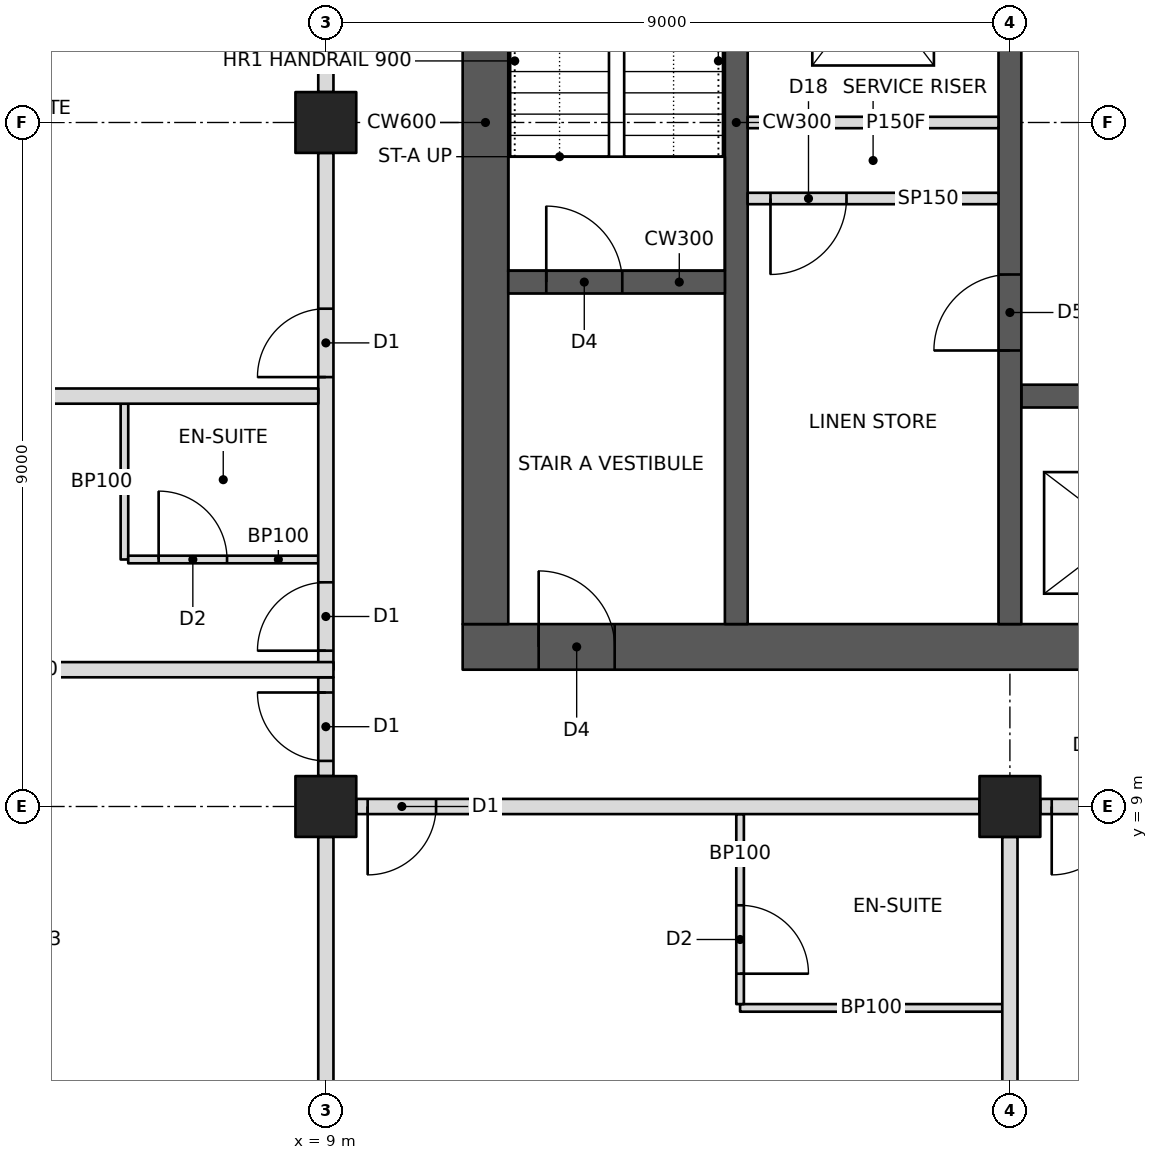
"""IFC4 building model, lengths in metres.
Left out: names, types, materials, properties, quantities, classifications, styles, units other than length and angle.
Written with IfcOpenShell. Run it as: python <this file> out.ifc"""

import sys

from ifc_helpers import new_model, si_unit, direction, frame, frame_2d, origin, origin_2d, place, context, subcontext, project, spatial, rectangle, hollow_rectangle, extrude, element, fill, save


model = new_model("IFC4")
c1 = context("Model", 3, precision=1e-05, world=origin(), true_north=direction((0.0, 1.0)))
c2 = subcontext(c1, "Body", "Model", "MODEL_VIEW")
j1 = project(units=[si_unit("LENGTHUNIT", "METRE"), si_unit("PLANEANGLEUNIT", "RADIAN")], contexts=[c1])
p1 = place(None, origin())
s1 = spatial("IfcSite", under=j1, at=p1, CompositionType="ELEMENT")
p2 = place(p1, origin())
s2 = spatial("IfcBuilding", under=s1, at=p2, CompositionType="ELEMENT")
p3 = place(p2, frame((0.0, 0.0, 180.8)))
s3 = spatial("IfcBuildingStorey", under=s2, at=p3, CompositionType="ELEMENT", Elevation=180.8)
for number, where, z_axis, x_axis in (
    (1, (9.0, 9.0, 0.0), (0.0, 0.0, 1.0), (1.0, 0.0, 0.0)),
    (2, (9.0, 18.0, 0.0), (0.0, 0.0, 1.0), (1.0, 0.0, 0.0)),
    (3, (18.0, 9.0, 0.0), (0.0, 0.0, 1.0), (1.0, 0.0, 0.0)),
):
    element("IfcColumn", number, at=place(p3, frame(where, z_axis=z_axis, x_axis=x_axis)), inside=s3, PredefinedType="COLUMN", context=c2, shape_type="SweptSolid", body=[
        extrude(hollow_rectangle(XDim=0.8, YDim=0.8, WallThickness=0.06, at=origin_2d()), origin(), (0.0, 0.0, 1.0), 3.4),
    ])
p4 = place(p3, frame((10.8, 11.1, 0.0), z_axis=(0.0, 0.0, 1.0), x_axis=(1.0, 0.0, 0.0)))
e4 = element("IfcWall", 4, at=p4, inside=s3, PredefinedType="SHEAR", context=c2, shape_type="SweptSolid", body=[
    extrude(rectangle(XDim=23.4, YDim=0.6, at=frame_2d((11.7, 0.0))), origin(), (0.0, 0.0, 1.0), 3.4),
])
p5 = place(p4, frame((1.0, 0.0, 0.0)))
e5 = element("IfcOpeningElement", 5, at=p5, cuts=e4, PredefinedType="OPENING", context=c2, shape_type="SweptSolid", body=[
    extrude(rectangle(XDim=1.0, YDim=2.1, at=frame_2d((0.5, 1.05))), frame((0.0, 0.31, 0.0), z_axis=(0.0, -1.0, 0.0), x_axis=(1.0, 0.0, 0.0)), (0.0, 0.0, 1.0), 0.62),
])
p6 = place(p4, frame((17.2, 0.0, 0.0)))
e6 = element("IfcOpeningElement", 6, at=p6, cuts=e4, PredefinedType="OPENING", context=c2, shape_type="SweptSolid", body=[
    extrude(rectangle(XDim=1.8, YDim=2.1, at=frame_2d((0.9, 1.05))), frame((0.0, 0.31, 0.0), z_axis=(0.0, -1.0, 0.0), x_axis=(1.0, 0.0, 0.0)), (0.0, 0.0, 1.0), 0.62),
])
p7 = place(p3, frame((11.1, 11.4, 0.0), z_axis=(0.0, 0.0, 1.0), x_axis=(0.0, 1.0, 0.0)))
e7 = element("IfcWall", 7, at=p7, inside=s3, PredefinedType="SHEAR", context=c2, shape_type="SweptSolid", body=[
    extrude(rectangle(XDim=13.2, YDim=0.6, at=frame_2d((6.6, 0.0))), origin(), (0.0, 0.0, 1.0), 3.4),
])
p8 = place(p3, frame((14.4, 11.4, 0.0), z_axis=(0.0, 0.0, 1.0), x_axis=(0.0, 1.0, 0.0)))
e8 = element("IfcWall", 8, at=p8, inside=s3, PredefinedType="SHEAR", context=c2, shape_type="SweptSolid", body=[
    extrude(rectangle(XDim=13.2, YDim=0.3, at=frame_2d((6.6, 0.0))), origin(), (0.0, 0.0, 1.0), 3.4),
])
p9 = place(p3, frame((11.4, 15.9, 0.0), z_axis=(0.0, 0.0, 1.0), x_axis=(1.0, 0.0, 0.0)))
e9 = element("IfcWall", 9, at=p9, inside=s3, PredefinedType="SHEAR", context=c2, shape_type="SweptSolid", body=[
    extrude(rectangle(XDim=2.85, YDim=0.3, at=frame_2d((1.425, 0.0))), origin(), (0.0, 0.0, 1.0), 3.4),
])
p10 = place(p9, frame((0.5, 0.0, 0.0)))
e10 = element("IfcOpeningElement", 10, at=p10, cuts=e9, PredefinedType="OPENING", context=c2, shape_type="SweptSolid", body=[
    extrude(rectangle(XDim=1.0, YDim=2.1, at=frame_2d((0.5, 1.05))), frame((0.0, 0.16, 0.0), z_axis=(0.0, -1.0, 0.0), x_axis=(1.0, 0.0, 0.0)), (0.0, 0.0, 1.0), 0.32),
])
p11 = place(p3, frame((18.0, 11.4, 0.0), z_axis=(0.0, 0.0, 1.0), x_axis=(0.0, 1.0, 0.0)))
e11 = element("IfcWall", 11, at=p11, inside=s3, PredefinedType="SHEAR", context=c2, shape_type="SweptSolid", body=[
    extrude(rectangle(XDim=13.2, YDim=0.3, at=frame_2d((6.6, 0.0))), origin(), (0.0, 0.0, 1.0), 3.4),
])
p12 = place(p11, frame((3.6, 0.0, 0.0)))
e12 = element("IfcOpeningElement", 12, at=p12, cuts=e11, PredefinedType="OPENING", context=c2, shape_type="SweptSolid", body=[
    extrude(rectangle(XDim=1.0, YDim=2.1, at=frame_2d((0.5, 1.05))), frame((0.0, 0.16, 0.0), z_axis=(0.0, -1.0, 0.0), x_axis=(1.0, 0.0, 0.0)), (0.0, 0.0, 1.0), 0.32),
])
p13 = place(p11, frame((7.85, 0.0, 0.0)))
e13 = element("IfcOpeningElement", 13, at=p13, cuts=e11, PredefinedType="OPENING", context=c2, shape_type="SweptSolid", body=[
    extrude(rectangle(XDim=1.1, YDim=2.1, at=frame_2d((0.55, 1.05))), frame((0.0, 0.16, 0.0), z_axis=(0.0, -1.0, 0.0), x_axis=(1.0, 0.0, 0.0)), (0.0, 0.0, 1.0), 0.32),
])
p14 = place(p3, frame((14.55, 18.0, 0.0), z_axis=(0.0, 0.0, 1.0), x_axis=(1.0, 0.0, 0.0)))
e14 = element("IfcWall", 14, at=p14, inside=s3, PredefinedType="PARTITIONING", context=c2, shape_type="SweptSolid", body=[
    extrude(rectangle(XDim=3.3, YDim=0.15, at=frame_2d((1.65, 0.0))), origin(), (0.0, 0.0, 1.0), 3.2),
])
p15 = place(p3, frame((18.15, 14.4, 0.0), z_axis=(0.0, 0.0, 1.0), x_axis=(1.0, 0.0, 0.0)))
e15 = element("IfcWall", 15, at=p15, inside=s3, PredefinedType="SHEAR", context=c2, shape_type="SweptSolid", body=[
    extrude(rectangle(XDim=9.0, YDim=0.3, at=frame_2d((4.5, 0.0))), origin(), (0.0, 0.0, 1.0), 3.4),
])
p16 = place(p15, frame((0.8, 0.0, 0.0)))
e16 = element("IfcOpeningElement", 16, at=p16, cuts=e15, PredefinedType="OPENING", context=c2, shape_type="SweptSolid", body=[
    extrude(rectangle(XDim=1.1, YDim=2.1, at=frame_2d((0.55, 1.05))), frame((0.0, 0.16, 0.0), z_axis=(0.0, -1.0, 0.0), x_axis=(1.0, 0.0, 0.0)), (0.0, 0.0, 1.0), 0.32),
])
p17 = place(p15, frame((6.75, 0.0, 0.0)))
e17 = element("IfcOpeningElement", 17, at=p17, cuts=e15, PredefinedType="OPENING", context=c2, shape_type="SweptSolid", body=[
    extrude(rectangle(XDim=1.2, YDim=2.1, at=frame_2d((0.6, 1.05))), frame((0.0, 0.16, 0.0), z_axis=(0.0, -1.0, 0.0), x_axis=(1.0, 0.0, 0.0)), (0.0, 0.0, 1.0), 0.32),
])
p18 = place(p15, frame((3.8, 0.0, 0.0)))
e18 = element("IfcOpeningElement", 18, at=p18, cuts=e15, PredefinedType="OPENING", context=c2, shape_type="SweptSolid", body=[
    extrude(rectangle(XDim=1.1, YDim=2.1, at=frame_2d((0.55, 1.05))), frame((0.0, 0.16, 0.0), z_axis=(0.0, -1.0, 0.0), x_axis=(1.0, 0.0, 0.0)), (0.0, 0.0, 1.0), 0.32),
])
p19 = place(p3, frame((9.4, 9.0, 0.0), z_axis=(0.0, 0.0, 1.0), x_axis=(1.0, 0.0, 0.0)))
e19 = element("IfcWall", 19, at=p19, inside=s3, PredefinedType="PARTITIONING", context=c2, shape_type="SweptSolid", body=[
    extrude(rectangle(XDim=8.2, YDim=0.2, at=frame_2d((4.1, 0.0))), origin(), (0.0, 0.0, 1.0), 2.405),
])
p20 = place(p19, frame((0.15, 0.0, 0.0)))
e20 = element("IfcOpeningElement", 20, at=p20, cuts=e19, PredefinedType="OPENING", context=c2, shape_type="SweptSolid", body=[
    extrude(rectangle(XDim=0.9, YDim=2.1, at=frame_2d((0.45, 1.05))), frame((0.0, 0.11, 0.0), z_axis=(0.0, -1.0, 0.0), x_axis=(1.0, 0.0, 0.0)), (0.0, 0.0, 1.0), 0.22),
])
p21 = place(p3, frame((18.4, 9.0, 0.0), z_axis=(0.0, 0.0, 1.0), x_axis=(1.0, 0.0, 0.0)))
e21 = element("IfcWall", 21, at=p21, inside=s3, PredefinedType="PARTITIONING", context=c2, shape_type="SweptSolid", body=[
    extrude(rectangle(XDim=8.2, YDim=0.2, at=frame_2d((4.1, 0.0))), origin(), (0.0, 0.0, 1.0), 2.405),
])
p22 = place(p21, frame((0.15, 0.0, 0.0)))
e22 = element("IfcOpeningElement", 22, at=p22, cuts=e21, PredefinedType="OPENING", context=c2, shape_type="SweptSolid", body=[
    extrude(rectangle(XDim=0.9, YDim=2.1, at=frame_2d((0.45, 1.05))), frame((0.0, 0.11, 0.0), z_axis=(0.0, -1.0, 0.0), x_axis=(1.0, 0.0, 0.0)), (0.0, 0.0, 1.0), 0.22),
])
p23 = place(p3, frame((9.0, 10.8, 0.0), z_axis=(0.0, 0.0, 1.0), x_axis=(0.0, 1.0, 0.0)))
e23 = element("IfcWall", 23, at=p23, inside=s3, PredefinedType="PARTITIONING", context=c2, shape_type="SweptSolid", body=[
    extrude(rectangle(XDim=6.8, YDim=0.2, at=frame_2d((3.4, 0.0))), origin(), (0.0, 0.0, 1.0), 2.405),
])
p24 = place(p23, frame((0.25, 0.0, 0.0)))
e24 = element("IfcOpeningElement", 24, at=p24, cuts=e23, PredefinedType="OPENING", context=c2, shape_type="SweptSolid", body=[
    extrude(rectangle(XDim=0.9, YDim=2.1, at=frame_2d((0.45, 1.05))), frame((0.0, 0.11, 0.0), z_axis=(0.0, -1.0, 0.0), x_axis=(1.0, 0.0, 0.0)), (0.0, 0.0, 1.0), 0.22),
])
p25 = place(p23, frame((3.85, 0.0, 0.0)))
e25 = element("IfcOpeningElement", 25, at=p25, cuts=e23, PredefinedType="OPENING", context=c2, shape_type="SweptSolid", body=[
    extrude(rectangle(XDim=0.9, YDim=2.1, at=frame_2d((0.45, 1.05))), frame((0.0, 0.11, 0.0), z_axis=(0.0, -1.0, 0.0), x_axis=(1.0, 0.0, 0.0)), (0.0, 0.0, 1.0), 0.22),
])
p26 = place(p3, frame((9.0, 18.4, 0.0), z_axis=(0.0, 0.0, 1.0), x_axis=(0.0, 1.0, 0.0)))
e26 = element("IfcWall", 26, at=p26, inside=s3, PredefinedType="PARTITIONING", context=c2, shape_type="SweptSolid", body=[
    extrude(rectangle(XDim=6.8, YDim=0.2, at=frame_2d((3.4, 0.0))), origin(), (0.0, 0.0, 1.0), 2.405),
])
p27 = place(p3, frame((1.0, 10.8, 0.0), z_axis=(0.0, 0.0, 1.0), x_axis=(1.0, 0.0, 0.0)))
e27 = element("IfcWall", 27, at=p27, inside=s3, PredefinedType="PARTITIONING", context=c2, shape_type="SweptSolid", body=[
    extrude(rectangle(XDim=8.1, YDim=0.2, at=frame_2d((4.05, 0.0))), origin(), (0.0, 0.0, 1.0), 2.404),
])
p28 = place(p3, frame((9.0, 8.6, 0.0), z_axis=(0.0, 0.0, 1.0), x_axis=(0.0, -1.0, 0.0)))
e28 = element("IfcWall", 28, at=p28, inside=s3, PredefinedType="PARTITIONING", context=c2, shape_type="SweptSolid", body=[
    extrude(rectangle(XDim=7.6, YDim=0.2, at=frame_2d((3.8, 0.0))), origin(), (0.0, 0.0, 1.0), 2.438),
])
p29 = place(p3, frame((18.0, 8.6, 0.0), z_axis=(0.0, 0.0, 1.0), x_axis=(0.0, -1.0, 0.0)))
e29 = element("IfcWall", 29, at=p29, inside=s3, PredefinedType="PARTITIONING", context=c2, shape_type="SweptSolid", body=[
    extrude(rectangle(XDim=7.6, YDim=0.2, at=frame_2d((3.8, 0.0))), origin(), (0.0, 0.0, 1.0), 2.405),
])
p30 = place(p3, frame((14.45, 6.35, 0.0), z_axis=(0.0, 0.0, 1.0), x_axis=(1.0, 0.0, 0.0)))
e30 = element("IfcWall", 30, at=p30, inside=s3, PredefinedType="PARTITIONING", context=c2, shape_type="SweptSolid", body=[
    extrude(rectangle(XDim=3.45, YDim=0.1, at=frame_2d((1.725, 0.0))), origin(), (0.0, 0.0, 1.0), 2.404),
])
p31 = place(p3, frame((14.45, 8.9, 0.0), z_axis=(0.0, 0.0, 1.0), x_axis=(0.0, -1.0, 0.0)))
e31 = element("IfcWall", 31, at=p31, inside=s3, PredefinedType="PARTITIONING", context=c2, shape_type="SweptSolid", body=[
    extrude(rectangle(XDim=2.5, YDim=0.1, at=frame_2d((1.25, 0.0))), origin(), (0.0, 0.0, 1.0), 2.404),
])
p32 = place(p31, frame((1.2, 0.0, 0.0)))
e32 = element("IfcOpeningElement", 32, at=p32, cuts=e31, PredefinedType="OPENING", context=c2, shape_type="SweptSolid", body=[
    extrude(rectangle(XDim=0.9, YDim=2.1, at=frame_2d((0.45, 1.05))), frame((0.0, 0.06, 0.0), z_axis=(0.0, -1.0, 0.0), x_axis=(1.0, 0.0, 0.0)), (0.0, 0.0, 1.0), 0.12),
])
p33 = place(p3, frame((8.9, 14.4, 0.0), z_axis=(0.0, 0.0, 1.0), x_axis=(-1.0, 0.0, 0.0)))
e33 = element("IfcWall", 33, at=p33, inside=s3, PredefinedType="PARTITIONING", context=c2, shape_type="SweptSolid", body=[
    extrude(rectangle(XDim=7.9, YDim=0.2, at=frame_2d((3.95, 0.0))), origin(), (0.0, 0.0, 1.0), 2.404),
])
p34 = place(p3, frame((6.35, 12.25, 0.0), z_axis=(0.0, 0.0, 1.0), x_axis=(0.0, 1.0, 0.0)))
e34 = element("IfcWall", 34, at=p34, inside=s3, PredefinedType="PARTITIONING", context=c2, shape_type="SweptSolid", body=[
    extrude(rectangle(XDim=2.05, YDim=0.1, at=frame_2d((1.025, 0.0))), origin(), (0.0, 0.0, 1.0), 3.2),
])
p35 = place(p3, frame((8.9, 12.25, 0.0), z_axis=(0.0, 0.0, 1.0), x_axis=(-1.0, 0.0, 0.0)))
e35 = element("IfcWall", 35, at=p35, inside=s3, PredefinedType="PARTITIONING", context=c2, shape_type="SweptSolid", body=[
    extrude(rectangle(XDim=2.5, YDim=0.1, at=frame_2d((1.25, 0.0))), origin(), (0.0, 0.0, 1.0), 2.404),
])
p36 = place(p35, frame((1.2, 0.0, 0.0)))
e36 = element("IfcOpeningElement", 36, at=p36, cuts=e35, PredefinedType="OPENING", context=c2, shape_type="SweptSolid", body=[
    extrude(rectangle(XDim=0.9, YDim=2.1, at=frame_2d((0.45, 1.05))), frame((0.0, 0.06, 0.0), z_axis=(0.0, -1.0, 0.0), x_axis=(1.0, 0.0, 0.0)), (0.0, 0.0, 1.0), 0.12),
])
p37 = place(p3, frame((9.0, 9.4, 0.0), z_axis=(0.0, 0.0, 1.0), x_axis=(0.0, 1.0, 0.0)))
e37 = element("IfcWall", 37, at=p37, inside=s3, PredefinedType="PARTITIONING", context=c2, shape_type="SweptSolid", body=[
    extrude(rectangle(XDim=1.3, YDim=0.2, at=frame_2d((0.65, 0.0))), origin(), (0.0, 0.0, 1.0), 2.405),
])
p38 = place(p37, frame((0.2, 0.0, 0.0)))
e38 = element("IfcOpeningElement", 38, at=p38, cuts=e37, PredefinedType="OPENING", context=c2, shape_type="SweptSolid", body=[
    extrude(rectangle(XDim=0.9, YDim=2.1, at=frame_2d((0.45, 1.05))), frame((0.0, 0.11, 0.0), z_axis=(0.0, -1.0, 0.0), x_axis=(1.0, 0.0, 0.0)), (0.0, 0.0, 1.0), 0.22),
])
p39 = place(p3, frame((14.55, 17.0, 0.0), z_axis=(0.0, 0.0, 1.0), x_axis=(1.0, 0.0, 0.0)))
e39 = element("IfcWall", 39, at=p39, inside=s3, PredefinedType="PARTITIONING", context=c2, shape_type="SweptSolid", body=[
    extrude(rectangle(XDim=3.3, YDim=0.15, at=frame_2d((1.65, 0.0))), origin(), (0.0, 0.0, 1.0), 3.2),
])
p40 = place(p39, frame((0.3, 0.0, 0.0)))
e40 = element("IfcOpeningElement", 40, at=p40, cuts=e39, PredefinedType="OPENING", context=c2, shape_type="SweptSolid", body=[
    extrude(rectangle(XDim=1.0, YDim=2.1, at=frame_2d((0.5, 1.05))), frame((0.0, 0.085, 0.0), z_axis=(0.0, -1.0, 0.0), x_axis=(1.0, 0.0, 0.0)), (0.0, 0.0, 1.0), 0.17),
])
p41 = place(p32, origin())
e41 = element("IfcDoor", 41, at=p41, inside=s3, OperationType="SINGLE_SWING_RIGHT", PredefinedType="DOOR", context=c2, shape_type="SweptSolid", body=[
    extrude(rectangle(XDim=0.9, YDim=2.1, at=frame_2d((0.45, 1.05))), frame((0.0, 0.025, 0.0), z_axis=(0.0, -1.0, 0.0), x_axis=(1.0, 0.0, 0.0)), (0.0, 0.0, 1.0), 0.05),
])
fill(e32, e41)
p42 = place(p20, frame((0.9, 0.0, 0.0), z_axis=(0.0, 0.0, 1.0), x_axis=(-1.0, 0.0, 0.0)))
e42 = element("IfcDoor", 42, at=p42, inside=s3, OperationType="SINGLE_SWING_RIGHT", PredefinedType="DOOR", context=c2, shape_type="SweptSolid", body=[
    extrude(rectangle(XDim=0.9, YDim=2.1, at=frame_2d((0.45, 1.05))), frame((0.0, 0.025, 0.0), z_axis=(0.0, -1.0, 0.0), x_axis=(1.0, 0.0, 0.0)), (0.0, 0.0, 1.0), 0.05),
])
fill(e20, e42)
p43 = place(p22, frame((0.9, 0.0, 0.0), z_axis=(0.0, 0.0, 1.0), x_axis=(-1.0, 0.0, 0.0)))
e43 = element("IfcDoor", 43, at=p43, inside=s3, OperationType="SINGLE_SWING_RIGHT", PredefinedType="DOOR", context=c2, shape_type="SweptSolid", body=[
    extrude(rectangle(XDim=0.9, YDim=2.1, at=frame_2d((0.45, 1.05))), frame((0.0, 0.025, 0.0), z_axis=(0.0, -1.0, 0.0), x_axis=(1.0, 0.0, 0.0)), (0.0, 0.0, 1.0), 0.05),
])
fill(e22, e43)
p44 = place(p36, frame((0.9, 0.0, 0.0), z_axis=(0.0, 0.0, 1.0), x_axis=(-1.0, 0.0, 0.0)))
e44 = element("IfcDoor", 44, at=p44, inside=s3, OperationType="SINGLE_SWING_LEFT", PredefinedType="DOOR", context=c2, shape_type="SweptSolid", body=[
    extrude(rectangle(XDim=0.9, YDim=2.1, at=frame_2d((0.45, 1.05))), frame((0.0, 0.025, 0.0), z_axis=(0.0, -1.0, 0.0), x_axis=(1.0, 0.0, 0.0)), (0.0, 0.0, 1.0), 0.05),
])
fill(e36, e44)
p45 = place(p24, origin())
e45 = element("IfcDoor", 45, at=p45, inside=s3, OperationType="SINGLE_SWING_LEFT", PredefinedType="DOOR", context=c2, shape_type="SweptSolid", body=[
    extrude(rectangle(XDim=0.9, YDim=2.1, at=frame_2d((0.45, 1.05))), frame((0.0, 0.025, 0.0), z_axis=(0.0, -1.0, 0.0), x_axis=(1.0, 0.0, 0.0)), (0.0, 0.0, 1.0), 0.05),
])
fill(e24, e45)
p46 = place(p25, origin())
e46 = element("IfcDoor", 46, at=p46, inside=s3, OperationType="SINGLE_SWING_LEFT", PredefinedType="DOOR", context=c2, shape_type="SweptSolid", body=[
    extrude(rectangle(XDim=0.9, YDim=2.1, at=frame_2d((0.45, 1.05))), frame((0.0, 0.025, 0.0), z_axis=(0.0, -1.0, 0.0), x_axis=(1.0, 0.0, 0.0)), (0.0, 0.0, 1.0), 0.05),
])
fill(e25, e46)
p47 = place(p38, origin())
e47 = element("IfcDoor", 47, at=p47, inside=s3, OperationType="SINGLE_SWING_RIGHT", PredefinedType="DOOR", context=c2, shape_type="SweptSolid", body=[
    extrude(rectangle(XDim=0.9, YDim=2.1, at=frame_2d((0.45, 1.05))), frame((0.0, 0.025, 0.0), z_axis=(0.0, -1.0, 0.0), x_axis=(1.0, 0.0, 0.0)), (0.0, 0.0, 1.0), 0.05),
])
fill(e38, e47)
p48 = place(p40, frame((1.0, 0.0, 0.0), z_axis=(0.0, 0.0, 1.0), x_axis=(-1.0, 0.0, 0.0)))
e48 = element("IfcDoor", 48, at=p48, inside=s3, OperationType="SINGLE_SWING_RIGHT", PredefinedType="DOOR", context=c2, shape_type="SweptSolid", body=[
    extrude(rectangle(XDim=1.0, YDim=2.1, at=frame_2d((0.5, 1.05))), frame((0.0, 0.025, 0.0), z_axis=(0.0, -1.0, 0.0), x_axis=(1.0, 0.0, 0.0)), (0.0, 0.0, 1.0), 0.05),
])
fill(e40, e48)
p49 = place(p5, origin())
e49 = element("IfcDoor", 49, at=p49, inside=s3, OperationType="SINGLE_SWING_LEFT", PredefinedType="DOOR", context=c2, shape_type="SweptSolid", body=[
    extrude(rectangle(XDim=1.0, YDim=2.1, at=frame_2d((0.5, 1.05))), frame((0.0, 0.025, 0.0), z_axis=(0.0, -1.0, 0.0), x_axis=(1.0, 0.0, 0.0)), (0.0, 0.0, 1.0), 0.05),
])
fill(e5, e49)
p50 = place(p10, origin())
e50 = element("IfcDoor", 50, at=p50, inside=s3, OperationType="SINGLE_SWING_LEFT", PredefinedType="DOOR", context=c2, shape_type="SweptSolid", body=[
    extrude(rectangle(XDim=1.0, YDim=2.1, at=frame_2d((0.5, 1.05))), frame((0.0, 0.025, 0.0), z_axis=(0.0, -1.0, 0.0), x_axis=(1.0, 0.0, 0.0)), (0.0, 0.0, 1.0), 0.05),
])
fill(e10, e50)
p51 = place(p12, origin())
e51 = element("IfcDoor", 51, at=p51, inside=s3, OperationType="SINGLE_SWING_LEFT", PredefinedType="DOOR", context=c2, shape_type="SweptSolid", body=[
    extrude(rectangle(XDim=1.0, YDim=2.1, at=frame_2d((0.5, 1.05))), frame((0.0, 0.025, 0.0), z_axis=(0.0, -1.0, 0.0), x_axis=(1.0, 0.0, 0.0)), (0.0, 0.0, 1.0), 0.05),
])
fill(e12, e51)
save(model, sys.argv[1])
